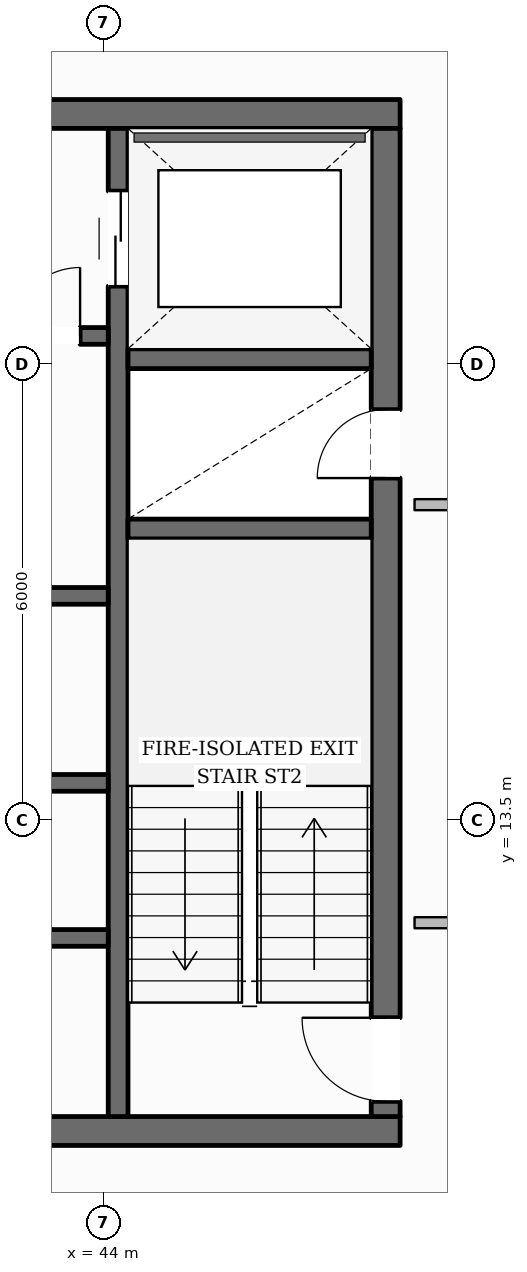
"""IFC4 building model, lengths in metres.
Left out: names, types, materials, properties, quantities, classifications, styles, units other than length and angle.
Written with IfcOpenShell. Run it as: python <this file> out.ifc"""

import sys

from ifc_helpers import new_model, si_unit, direction, frame, frame_2d, origin, place, context, subcontext, project, spatial, rectangle, extrude, element, fill, save


model = new_model("IFC4")
c1 = context("Model", 3, precision=1e-05, world=origin(), true_north=direction((0.0, 1.0)))
c2 = subcontext(c1, "Body", "Model", "MODEL_VIEW")
j1 = project(units=[si_unit("LENGTHUNIT", "METRE"), si_unit("PLANEANGLEUNIT", "RADIAN")], contexts=[c1])
p1 = place(None, origin())
s1 = spatial("IfcSite", under=j1, at=p1, CompositionType="ELEMENT")
p2 = place(p1, origin())
s2 = spatial("IfcBuilding", under=s1, at=p2, CompositionType="ELEMENT")
p3 = place(p2, frame((0.0, 0.0, 262.6)))
s3 = spatial("IfcBuildingStorey", under=s2, at=p3, CompositionType="ELEMENT", Elevation=262.6)
p4 = place(p3, frame((28.1, 9.41, 0.0), z_axis=(0.0, 0.0, 1.0), x_axis=(1.0, 0.0, 0.0)))
e1 = element("IfcWall", 1, at=p4, inside=s3, PredefinedType="SOLIDWALL", context=c2, shape_type="SweptSolid", body=[
    extrude(rectangle(XDim=19.8, YDim=0.38, at=frame_2d((9.9, 0.0))), origin(), (0.0, 0.0, 1.0), 3.61),
])
p5 = place(p4, frame((10.4, 0.0, 0.0)))
e2 = element("IfcOpeningElement", 2, at=p5, cuts=e1, PredefinedType="OPENING", context=c2, shape_type="SweptSolid", body=[
    extrude(rectangle(XDim=1.4, YDim=2.2, at=frame_2d((0.7, 1.1))), frame((0.0, 0.2, 0.0), z_axis=(0.0, -1.0, 0.0), x_axis=(1.0, 0.0, 0.0)), (0.0, 0.0, 1.0), 0.4),
])
p6 = place(p3, frame((28.1, 22.79, 0.0), z_axis=(0.0, 0.0, 1.0), x_axis=(1.0, 0.0, 0.0)))
e3 = element("IfcWall", 3, at=p6, inside=s3, PredefinedType="SOLIDWALL", context=c2, shape_type="SweptSolid", body=[
    extrude(rectangle(XDim=19.8, YDim=0.38, at=frame_2d((9.9, 0.0))), origin(), (0.0, 0.0, 1.0), 3.61),
])
p7 = place(p6, frame((6.175, 0.0, 0.0)))
e4 = element("IfcOpeningElement", 4, at=p7, cuts=e3, PredefinedType="OPENING", context=c2, shape_type="SweptSolid", body=[
    extrude(rectangle(XDim=1.05, YDim=2.15, at=frame_2d((0.525, 1.075))), frame((0.0, 0.2, 0.0), z_axis=(0.0, -1.0, 0.0), x_axis=(1.0, 0.0, 0.0)), (0.0, 0.0, 1.0), 0.4),
])
p8 = place(p6, frame((12.575, 0.0, 0.0)))
e5 = element("IfcOpeningElement", 5, at=p8, cuts=e3, PredefinedType="OPENING", context=c2, shape_type="SweptSolid", body=[
    extrude(rectangle(XDim=1.05, YDim=2.15, at=frame_2d((0.525, 1.075))), frame((0.0, 0.2, 0.0), z_axis=(0.0, -1.0, 0.0), x_axis=(1.0, 0.0, 0.0)), (0.0, 0.0, 1.0), 0.4),
])
p9 = place(p3, frame((47.71, 9.6, 0.0), z_axis=(0.0, 0.0, 1.0), x_axis=(0.0, 1.0, 0.0)))
e6 = element("IfcWall", 6, at=p9, inside=s3, PredefinedType="SOLIDWALL", context=c2, shape_type="SweptSolid", body=[
    extrude(rectangle(XDim=13.0, YDim=0.38, at=frame_2d((6.5, 0.0))), origin(), (0.0, 0.0, 1.0), 3.61),
])
p10 = place(p9, frame((0.2, 0.0, 0.0)))
e7 = element("IfcOpeningElement", 7, at=p10, cuts=e6, PredefinedType="OPENING", context=c2, shape_type="SweptSolid", body=[
    extrude(rectangle(XDim=1.1, YDim=2.15, at=frame_2d((0.55, 1.075))), frame((0.0, 0.2, 0.0), z_axis=(0.0, -1.0, 0.0), x_axis=(1.0, 0.0, 0.0)), (0.0, 0.0, 1.0), 0.4),
])
p11 = place(p9, frame((8.4, 0.0, 0.0)))
e8 = element("IfcOpeningElement", 8, at=p11, cuts=e6, PredefinedType="OPENING", context=c2, shape_type="SweptSolid", body=[
    extrude(rectangle(XDim=0.9, YDim=2.1, at=frame_2d((0.45, 1.05))), frame((0.0, 0.2, 0.0), z_axis=(0.0, -1.0, 0.0), x_axis=(1.0, 0.0, 0.0)), (0.0, 0.0, 1.0), 0.4),
])
p12 = place(p3, frame((44.19, 9.6, 0.0), z_axis=(0.0, 0.0, 1.0), x_axis=(0.0, 1.0, 0.0)))
e9 = element("IfcWall", 9, at=p12, inside=s3, PredefinedType="SHEAR", context=c2, shape_type="SweptSolid", body=[
    extrude(rectangle(XDim=13.0, YDim=0.26, at=frame_2d((6.5, 0.0))), origin(), (0.0, 0.0, 1.0), 3.61),
])
p13 = place(p12, frame((10.925, 0.0, 0.0)))
e10 = element("IfcOpeningElement", 10, at=p13, cuts=e9, PredefinedType="OPENING", context=c2, shape_type="SweptSolid", body=[
    extrude(rectangle(XDim=1.25, YDim=2.25, at=frame_2d((0.625, 1.125))), frame((0.0, 0.14, 0.0), z_axis=(0.0, -1.0, 0.0), x_axis=(1.0, 0.0, 0.0)), (0.0, 0.0, 1.0), 0.28),
])
for number, where, z_axis, x_axis in (
    (11, (44.32, 17.33, 0.0), (0.0, 0.0, 1.0), (1.0, 0.0, 0.0)),
    (12, (44.32, 19.57, 0.0), (0.0, 0.0, 1.0), (1.0, 0.0, 0.0)),
):
    element("IfcWall", number, at=place(p3, frame(where, z_axis=z_axis, x_axis=x_axis)), inside=s3, PredefinedType="SHEAR", context=c2, shape_type="SweptSolid", body=[
        extrude(rectangle(XDim=3.2, YDim=0.26, at=frame_2d((1.6, 0.0))), origin(), (0.0, 0.0, 1.0), 3.61),
    ])
p14 = place(p3, frame((31.94, 19.87, 0.0), z_axis=(0.0, 0.0, 1.0), x_axis=(1.0, 0.0, 0.0)))
e13 = element("IfcWall", 13, at=p14, inside=s3, PredefinedType="SOLIDWALL", context=c2, shape_type="SweptSolid", body=[
    extrude(rectangle(XDim=12.12, YDim=0.22, at=frame_2d((6.06, 0.0))), origin(), (0.0, 0.0, 1.0), 3.61),
])
p15 = place(p14, frame((6.3, 0.0, 0.0)))
e14 = element("IfcOpeningElement", 14, at=p15, cuts=e13, PredefinedType="OPENING", context=c2, shape_type="SweptSolid", body=[
    extrude(rectangle(XDim=1.1, YDim=2.15, at=frame_2d((0.55, 1.075))), frame((0.0, 0.12, 0.0), z_axis=(0.0, -1.0, 0.0), x_axis=(1.0, 0.0, 0.0)), (0.0, 0.0, 1.0), 0.24),
])
p16 = place(p14, frame((8.61, 0.0, 0.0)))
e15 = element("IfcOpeningElement", 15, at=p16, cuts=e13, PredefinedType="OPENING", context=c2, shape_type="SweptSolid", body=[
    extrude(rectangle(XDim=0.9, YDim=2.1, at=frame_2d((0.45, 1.05))), frame((0.0, 0.12, 0.0), z_axis=(0.0, -1.0, 0.0), x_axis=(1.0, 0.0, 0.0)), (0.0, 0.0, 1.0), 0.24),
])
p17 = place(p14, frame((10.85, 0.0, 0.0)))
e16 = element("IfcOpeningElement", 16, at=p17, cuts=e13, PredefinedType="OPENING", context=c2, shape_type="SweptSolid", body=[
    extrude(rectangle(XDim=0.9, YDim=2.1, at=frame_2d((0.45, 1.05))), frame((0.0, 0.12, 0.0), z_axis=(0.0, -1.0, 0.0), x_axis=(1.0, 0.0, 0.0)), (0.0, 0.0, 1.0), 0.24),
])
p18 = place(p3, frame((31.94, 16.45, 0.0), z_axis=(0.0, 0.0, 1.0), x_axis=(1.0, 0.0, 0.0)))
e17 = element("IfcWall", 17, at=p18, inside=s3, PredefinedType="SOLIDWALL", context=c2, shape_type="SweptSolid", body=[
    extrude(rectangle(XDim=12.12, YDim=0.22, at=frame_2d((6.06, 0.0))), origin(), (0.0, 0.0, 1.0), 3.61),
])
p19 = place(p3, frame((31.94, 13.99, 0.0), z_axis=(0.0, 0.0, 1.0), x_axis=(1.0, 0.0, 0.0)))
e18 = element("IfcWall", 18, at=p19, inside=s3, PredefinedType="SOLIDWALL", context=c2, shape_type="SweptSolid", body=[
    extrude(rectangle(XDim=12.12, YDim=0.22, at=frame_2d((6.06, 0.0))), origin(), (0.0, 0.0, 1.0), 3.61),
])
p20 = place(p19, frame((1.91, 0.0, 0.0)))
e19 = element("IfcOpeningElement", 19, at=p20, cuts=e18, PredefinedType="OPENING", context=c2, shape_type="SweptSolid", body=[
    extrude(rectangle(XDim=0.9, YDim=2.1, at=frame_2d((0.45, 1.05))), frame((0.0, 0.12, 0.0), z_axis=(0.0, -1.0, 0.0), x_axis=(1.0, 0.0, 0.0)), (0.0, 0.0, 1.0), 0.24),
])
p21 = place(p19, frame((7.95, 0.0, 0.0)))
e20 = element("IfcOpeningElement", 20, at=p21, cuts=e18, PredefinedType="OPENING", context=c2, shape_type="SweptSolid", body=[
    extrude(rectangle(XDim=1.02, YDim=2.15, at=frame_2d((0.51, 1.075))), frame((0.0, 0.12, 0.0), z_axis=(0.0, -1.0, 0.0), x_axis=(1.0, 0.0, 0.0)), (0.0, 0.0, 1.0), 0.24),
])
p22 = place(p3, frame((40.28, 11.95, 0.0), z_axis=(0.0, 0.0, 1.0), x_axis=(1.0, 0.0, 0.0)))
e21 = element("IfcWall", 21, at=p22, inside=s3, PredefinedType="SOLIDWALL", context=c2, shape_type="SweptSolid", body=[
    extrude(rectangle(XDim=3.78, YDim=0.22, at=frame_2d((1.89, 0.0))), origin(), (0.0, 0.0, 1.0), 3.61),
])
p23 = place(p22, frame((1.55, 0.0, 0.0)))
e22 = element("IfcOpeningElement", 22, at=p23, cuts=e21, PredefinedType="OPENING", context=c2, shape_type="SweptSolid", body=[
    extrude(rectangle(XDim=0.9, YDim=2.1, at=frame_2d((0.45, 1.05))), frame((0.0, 0.12, 0.0), z_axis=(0.0, -1.0, 0.0), x_axis=(1.0, 0.0, 0.0)), (0.0, 0.0, 1.0), 0.24),
])
p24 = place(p3, frame((41.23, 43.577, 0.0), z_axis=(0.0, 0.0, 1.0), x_axis=(0.507689696002, -0.861540000565, 0.0)))
e23 = element("IfcWall", 23, at=p24, inside=s3, PredefinedType="STANDARD", context=c2, shape_type="SweptSolid", body=[
    extrude(rectangle(XDim=38.41, YDim=0.35, at=frame_2d((19.205, 0.0))), origin(), (0.0, 0.0, 1.0), 3.196),
])
p25 = place(p24, frame((34.134, 0.0, 0.65)))
e24 = element("IfcOpeningElement", 24, at=p25, cuts=e23, PredefinedType="OPENING", context=c2, shape_type="SweptSolid", body=[
    extrude(rectangle(XDim=1.35, YDim=1.75, at=frame_2d((0.675, 0.875))), frame((0.0, 0.185, 0.0), z_axis=(0.0, -1.0, 0.0), x_axis=(1.0, 0.0, 0.0)), (0.0, 0.0, 1.0), 0.37),
])
p26 = place(p24, frame((27.89, 0.0, 0.65)))
e25 = element("IfcOpeningElement", 25, at=p26, cuts=e23, PredefinedType="OPENING", context=c2, shape_type="SweptSolid", body=[
    extrude(rectangle(XDim=1.35, YDim=1.75, at=frame_2d((0.675, 0.875))), frame((0.0, 0.185, 0.0), z_axis=(0.0, -1.0, 0.0), x_axis=(1.0, 0.0, 0.0)), (0.0, 0.0, 1.0), 0.37),
])
p27 = place(p24, frame((21.647, 0.0, 0.65)))
e26 = element("IfcOpeningElement", 26, at=p27, cuts=e23, PredefinedType="OPENING", context=c2, shape_type="SweptSolid", body=[
    extrude(rectangle(XDim=1.35, YDim=1.75, at=frame_2d((0.675, 0.875))), frame((0.0, 0.185, 0.0), z_axis=(0.0, -1.0, 0.0), x_axis=(1.0, 0.0, 0.0)), (0.0, 0.0, 1.0), 0.37),
])
p28 = place(p24, frame((9.161, 0.0, 0.65)))
e27 = element("IfcOpeningElement", 27, at=p28, cuts=e23, PredefinedType="OPENING", context=c2, shape_type="SweptSolid", body=[
    extrude(rectangle(XDim=1.35, YDim=1.75, at=frame_2d((0.675, 0.875))), frame((0.0, 0.185, 0.0), z_axis=(0.0, -1.0, 0.0), x_axis=(1.0, 0.0, 0.0)), (0.0, 0.0, 1.0), 0.37),
])
p29 = place(p24, frame((2.917, 0.0, 0.65)))
e28 = element("IfcOpeningElement", 28, at=p29, cuts=e23, PredefinedType="OPENING", context=c2, shape_type="SweptSolid", body=[
    extrude(rectangle(XDim=1.35, YDim=1.75, at=frame_2d((0.675, 0.875))), frame((0.0, 0.185, 0.0), z_axis=(0.0, -1.0, 0.0), x_axis=(1.0, 0.0, 0.0)), (0.0, 0.0, 1.0), 0.37),
])
for number, where, z_axis, x_axis in (
    (29, (49.91, 17.65, 0.0), (0.0, 0.0, 1.0), (-1.0, 0.0, 0.0)),
    (30, (48.09, 12.15, 0.0), (0.0, 0.0, 1.0), (1.0, 0.0, 0.0)),
):
    element("IfcWall", number, at=place(p3, frame(where, z_axis=z_axis, x_axis=x_axis)), inside=s3, PredefinedType="PARTITIONING", context=c2, shape_type="SweptSolid", body=[
        extrude(rectangle(XDim=1.82, YDim=0.145, at=frame_2d((0.91, 0.0))), origin(), (0.0, 0.0, 1.0), 3.61),
    ])
p30 = place(p10, origin())
e31 = element("IfcDoor", 31, at=p30, inside=s3, OperationType="SINGLE_SWING_RIGHT", PredefinedType="DOOR", context=c2, shape_type="SweptSolid", body=[
    extrude(rectangle(XDim=1.1, YDim=2.15, at=frame_2d((0.55, 1.075))), frame((0.0, 0.025, 0.0), z_axis=(0.0, -1.0, 0.0), x_axis=(1.0, 0.0, 0.0)), (0.0, 0.0, 1.0), 0.05),
])
fill(e7, e31)
p31 = place(p11, origin())
e32 = element("IfcDoor", 32, at=p31, inside=s3, OperationType="SINGLE_SWING_LEFT", PredefinedType="DOOR", context=c2, shape_type="SweptSolid", body=[
    extrude(rectangle(XDim=0.9, YDim=2.1, at=frame_2d((0.45, 1.05))), frame((0.0, 0.025, 0.0), z_axis=(0.0, -1.0, 0.0), x_axis=(1.0, 0.0, 0.0)), (0.0, 0.0, 1.0), 0.05),
])
fill(e8, e32)
p32 = place(p13, origin())
e33 = element("IfcDoor", 33, at=p32, inside=s3, OperationType="DOUBLE_DOOR_SLIDING", PredefinedType="DOOR", context=c2, shape_type="SweptSolid", body=[
    extrude(rectangle(XDim=1.25, YDim=2.25, at=frame_2d((0.625, 1.125))), frame((0.0, 0.025, 0.0), z_axis=(0.0, -1.0, 0.0), x_axis=(1.0, 0.0, 0.0)), (0.0, 0.0, 1.0), 0.05),
])
fill(e10, e33)
p33 = place(p17, origin())
e34 = element("IfcDoor", 34, at=p33, inside=s3, OperationType="SINGLE_SWING_RIGHT", PredefinedType="DOOR", context=c2, shape_type="SweptSolid", body=[
    extrude(rectangle(XDim=0.9, YDim=2.1, at=frame_2d((0.45, 1.05))), frame((0.0, 0.025, 0.0), z_axis=(0.0, -1.0, 0.0), x_axis=(1.0, 0.0, 0.0)), (0.0, 0.0, 1.0), 0.05),
])
fill(e16, e34)
save(model, sys.argv[1])
